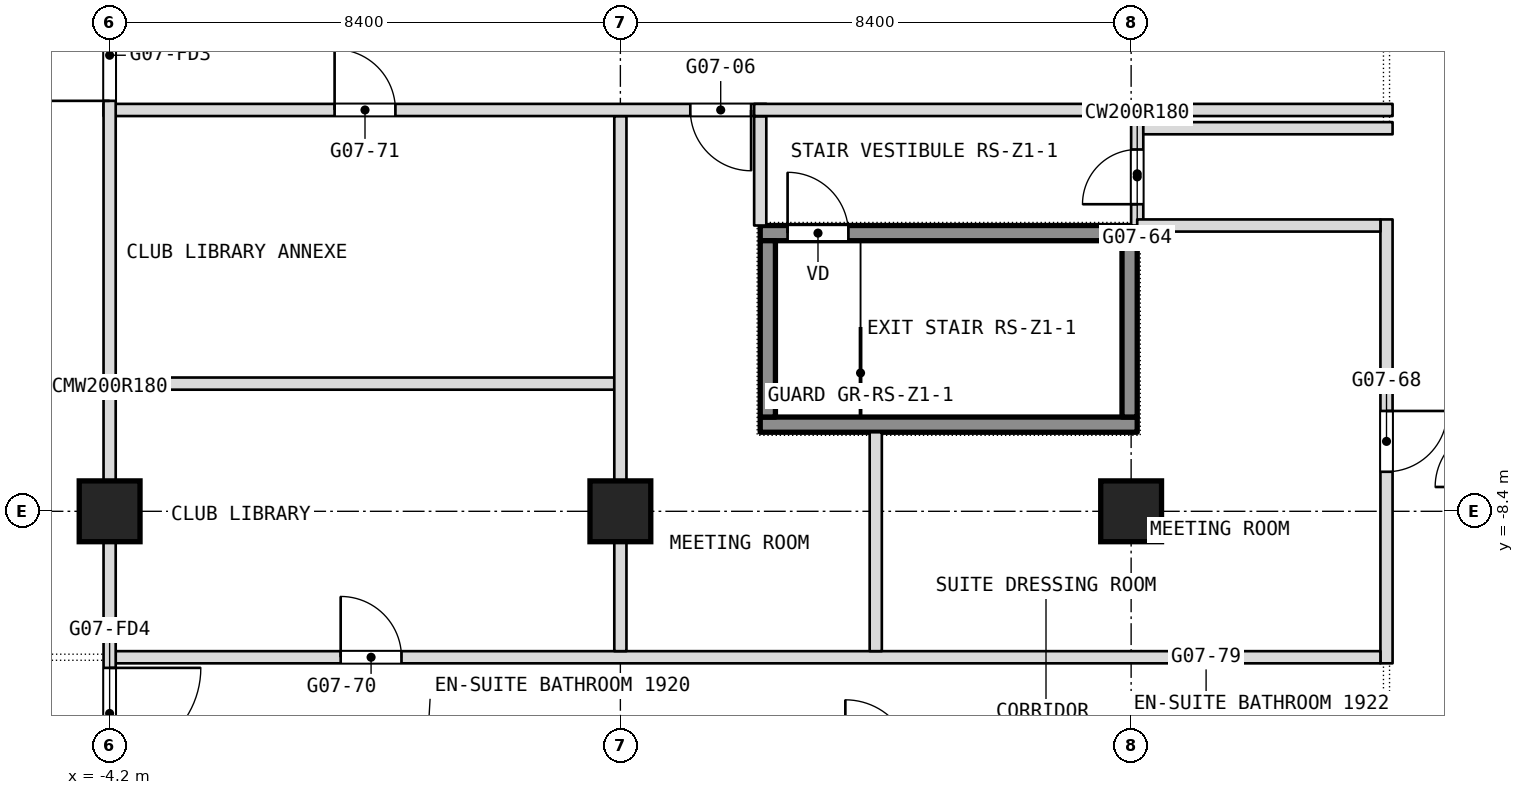
"""IFC4 building model, lengths in metres.
Left out: names, types, materials, properties, quantities, classifications, styles, units other than length and angle.
Written with IfcOpenShell. Run it as: python <this file> out.ifc"""

import sys

from ifc_helpers import new_model, si_unit, direction, frame, frame_2d, origin, origin_2d, place, context, subcontext, project, spatial, rectangle, extrude, element, fill, save


model = new_model("IFC4")
c1 = context("Model", 3, precision=1e-05, world=origin(), true_north=direction((0.0, 1.0)))
c2 = subcontext(c1, "Body", "Model", "MODEL_VIEW")
j1 = project(units=[si_unit("LENGTHUNIT", "METRE"), si_unit("PLANEANGLEUNIT", "RADIAN")], contexts=[c1])
p1 = place(None, origin())
s1 = spatial("IfcSite", under=j1, at=p1, CompositionType="ELEMENT")
p2 = place(p1, origin())
s2 = spatial("IfcBuilding", under=s1, at=p2, CompositionType="ELEMENT")
p3 = place(p2, frame((0.0, 0.0, 83.3)))
s3 = spatial("IfcBuildingStorey", under=s2, at=p3, CompositionType="ELEMENT", Elevation=83.3)
for number, where, z_axis, x_axis in (
    (1, (-4.2, -8.4, 0.0), (0.0, 0.0, 1.0), (1.0, 0.0, 0.0)),
    (2, (4.2, -8.4, 0.0), (0.0, 0.0, 1.0), (1.0, 0.0, 0.0)),
    (3, (12.6, -8.4, 0.0), (0.0, 0.0, 1.0), (1.0, 0.0, 0.0)),
):
    element("IfcColumn", number, at=place(p3, frame(where, z_axis=z_axis, x_axis=x_axis)), inside=s3, PredefinedType="COLUMN", context=c2, shape_type="SweptSolid", body=[
        extrude(rectangle(XDim=1.0, YDim=1.0, at=origin_2d()), origin(), (0.0, 0.0, 1.0), 3.6),
    ])
p4 = place(p3, frame((16.8, -10.9, 0.0), z_axis=(0.0, 0.0, 1.0), x_axis=(0.0, 1.0, 0.0)))
e4 = element("IfcWall", 4, at=p4, inside=s3, PredefinedType="PARTITIONING", context=c2, shape_type="SweptSolid", body=[
    extrude(rectangle(XDim=7.3, YDim=0.2, at=frame_2d((3.65, 0.0))), origin(), (0.0, 0.0, 1.0), 3.3),
])
p5 = place(p4, frame((3.15, 0.0, 0.0)))
e5 = element("IfcOpeningElement", 5, at=p5, cuts=e4, PredefinedType="OPENING", context=c2, shape_type="SweptSolid", body=[
    extrude(rectangle(XDim=1.0, YDim=2.1, at=frame_2d((0.5, 1.05))), frame((0.0, 0.1, 0.0), z_axis=(0.0, -1.0, 0.0), x_axis=(1.0, 0.0, 0.0)), (0.0, 0.0, 1.0), 0.2),
])
p6 = place(p3, frame((12.7, -3.7, 0.0), z_axis=(0.0, 0.0, 1.0), x_axis=(0.0, 1.0, 0.0)))
e6 = element("IfcWall", 6, at=p6, inside=s3, PredefinedType="PARTITIONING", context=c2, shape_type="SweptSolid", body=[
    extrude(rectangle(XDim=1.7, YDim=0.2, at=frame_2d((0.85, 0.0))), origin(), (0.0, 0.0, 1.0), 2.486),
])
p7 = place(p6, frame((0.35, 0.0, 0.0)))
e7 = element("IfcOpeningElement", 7, at=p7, cuts=e6, PredefinedType="OPENING", context=c2, shape_type="SweptSolid", body=[
    extrude(rectangle(XDim=0.9, YDim=2.1, at=frame_2d((0.45, 1.05))), frame((0.0, 0.1, 0.0), z_axis=(0.0, -1.0, 0.0), x_axis=(1.0, 0.0, 0.0)), (0.0, 0.0, 1.0), 0.2),
])
p8 = place(p3, frame((-4.1, -10.8, 0.0), z_axis=(0.0, 0.0, 1.0), x_axis=(1.0, 0.0, 0.0)))
e8 = element("IfcWall", 8, at=p8, inside=s3, PredefinedType="PARTITIONING", context=c2, shape_type="SweptSolid", body=[
    extrude(rectangle(XDim=20.8, YDim=0.2, at=frame_2d((10.4, 0.0))), origin(), (0.0, 0.0, 1.0), 3.3),
])
p9 = place(p8, frame((3.7, 0.0, 0.0)))
e9 = element("IfcOpeningElement", 9, at=p9, cuts=e8, PredefinedType="OPENING", context=c2, shape_type="SweptSolid", body=[
    extrude(rectangle(XDim=1.0, YDim=2.1, at=frame_2d((0.5, 1.05))), frame((0.0, 0.1, 0.0), z_axis=(0.0, -1.0, 0.0), x_axis=(1.0, 0.0, 0.0)), (0.0, 0.0, 1.0), 0.2),
])
p10 = place(p3, frame((8.4, -10.7, 0.0), z_axis=(0.0, 0.0, 1.0), x_axis=(0.0, 1.0, 0.0)))
e10 = element("IfcWall", 10, at=p10, inside=s3, PredefinedType="PARTITIONING", context=c2, shape_type="SweptSolid", body=[
    extrude(rectangle(XDim=3.6, YDim=0.2, at=frame_2d((1.8, 0.0))), origin(), (0.0, 0.0, 1.0), 3.3),
])
p11 = place(p3, frame((6.5, -3.7, 0.0), z_axis=(0.0, 0.0, 1.0), x_axis=(0.0, 1.0, 0.0)))
e11 = element("IfcWall", 11, at=p11, inside=s3, PredefinedType="PARTITIONING", context=c2, shape_type="SweptSolid", body=[
    extrude(rectangle(XDim=1.8, YDim=0.2, at=frame_2d((0.9, 0.0))), origin(), (0.0, 0.0, 1.0), 3.3),
])
p12 = place(p3, frame((-4.1, -6.3, 0.0), z_axis=(0.0, 0.0, 1.0), x_axis=(1.0, 0.0, 0.0)))
e12 = element("IfcWall", 12, at=p12, inside=s3, PredefinedType="PARTITIONING", context=c2, shape_type="SweptSolid", body=[
    extrude(rectangle(XDim=8.2, YDim=0.2, at=frame_2d((4.1, 0.0))), origin(), (0.0, 0.0, 1.0), 3.3),
])
p13 = place(p3, frame((4.2, -10.7, 0.0), z_axis=(0.0, 0.0, 1.0), x_axis=(0.0, 1.0, 0.0)))
e13 = element("IfcWall", 13, at=p13, inside=s3, PredefinedType="PARTITIONING", context=c2, shape_type="SweptSolid", body=[
    extrude(rectangle(XDim=8.8, YDim=0.2, at=frame_2d((4.4, 0.0))), origin(), (0.0, 0.0, 1.0), 2.486),
])
p14 = place(p3, frame((12.7, -3.7, 0.0), z_axis=(0.0, 0.0, 1.0), x_axis=(1.0, 0.0, 0.0)))
e14 = element("IfcWall", 14, at=p14, inside=s3, PredefinedType="PARTITIONING", context=c2, shape_type="SweptSolid", body=[
    extrude(rectangle(XDim=4.0, YDim=0.2, at=frame_2d((2.0, 0.0))), origin(), (0.0, 0.0, 1.0), 3.3),
])
p15 = place(p3, frame((12.8, -2.1, 0.0), z_axis=(0.0, 0.0, 1.0), x_axis=(1.0, 0.0, 0.0)))
e15 = element("IfcWall", 15, at=p15, inside=s3, PredefinedType="PARTITIONING", context=c2, shape_type="SweptSolid", body=[
    extrude(rectangle(XDim=4.1, YDim=0.2, at=frame_2d((2.05, 0.0))), origin(), (0.0, 0.0, 1.0), 3.3),
])
p16 = place(p3, frame((-4.3, -1.8, 0.0), z_axis=(0.0, 0.0, 1.0), x_axis=(1.0, 0.0, 0.0)))
e16 = element("IfcWall", 16, at=p16, inside=s3, PredefinedType="PARTITIONING", context=c2, shape_type="SweptSolid", body=[
    extrude(rectangle(XDim=10.9, YDim=0.2, at=frame_2d((5.45, 0.0))), origin(), (0.0, 0.0, 1.0), 3.3),
])
p17 = place(p16, frame((9.65, 0.0, 0.0)))
e17 = element("IfcOpeningElement", 17, at=p17, cuts=e16, PredefinedType="OPENING", context=c2, shape_type="SweptSolid", body=[
    extrude(rectangle(XDim=1.0, YDim=2.1, at=frame_2d((0.5, 1.05))), frame((0.0, 0.1, 0.0), z_axis=(0.0, -1.0, 0.0), x_axis=(1.0, 0.0, 0.0)), (0.0, 0.0, 1.0), 0.2),
])
p18 = place(p16, frame((3.8, 0.0, 0.0)))
e18 = element("IfcOpeningElement", 18, at=p18, cuts=e16, PredefinedType="OPENING", context=c2, shape_type="SweptSolid", body=[
    extrude(rectangle(XDim=1.0, YDim=2.1, at=frame_2d((0.5, 1.05))), frame((0.0, 0.1, 0.0), z_axis=(0.0, -1.0, 0.0), x_axis=(1.0, 0.0, 0.0)), (0.0, 0.0, 1.0), 0.2),
])
p19 = place(p3, frame((6.4, -1.8, 0.0), z_axis=(0.0, 0.0, 1.0), x_axis=(1.0, 0.0, 0.0)))
e19 = element("IfcWall", 19, at=p19, inside=s3, PredefinedType="PARTITIONING", context=c2, shape_type="SweptSolid", body=[
    extrude(rectangle(XDim=10.5, YDim=0.2, at=frame_2d((5.25, 0.0))), origin(), (0.0, 0.0, 1.0), 3.3),
])
p20 = place(p3, frame((-4.2, -12.7, 0.0), z_axis=(0.0, 0.0, 1.0), x_axis=(0.0, 1.0, 0.0)))
e20 = element("IfcWall", 20, at=p20, inside=s3, PredefinedType="PARTITIONING", context=c2, shape_type="SweptSolid", body=[
    extrude(rectangle(XDim=12.7, YDim=0.2, at=frame_2d((6.35, 0.0))), origin(), (0.0, 0.0, 1.0), 2.486),
])
p21 = place(p20, frame((11.05, 0.0, 0.0)))
e21 = element("IfcOpeningElement", 21, at=p21, cuts=e20, PredefinedType="OPENING", context=c2, shape_type="SweptSolid", body=[
    extrude(rectangle(XDim=1.5, YDim=2.1, at=frame_2d((0.75, 1.05))), frame((0.0, 0.1, 0.0), z_axis=(0.0, -1.0, 0.0), x_axis=(1.0, 0.0, 0.0)), (0.0, 0.0, 1.0), 0.2),
])
p22 = place(p20, frame((0.225, 0.0, 0.0)))
e22 = element("IfcOpeningElement", 22, at=p22, cuts=e20, PredefinedType="OPENING", context=c2, shape_type="SweptSolid", body=[
    extrude(rectangle(XDim=1.5, YDim=2.1, at=frame_2d((0.75, 1.05))), frame((0.0, 0.1, 0.0), z_axis=(0.0, -1.0, 0.0), x_axis=(1.0, 0.0, 0.0)), (0.0, 0.0, 1.0), 0.2),
])
p23 = place(p3, frame((6.5, -6.975, 0.1), z_axis=(0.0, 0.0, 1.0), x_axis=(1.0, 0.0, 0.0)))
e23 = element("IfcWall", 23, at=p23, inside=s3, PredefinedType="SHEAR", context=c2, shape_type="SweptSolid", body=[
    extrude(rectangle(XDim=6.2, YDim=0.25, at=frame_2d((3.1, 0.0))), origin(), (0.0, 0.0, 1.0), 3.2),
])
p24 = place(p3, frame((6.5, -3.825, 0.1), z_axis=(0.0, 0.0, 1.0), x_axis=(1.0, 0.0, 0.0)))
e24 = element("IfcWall", 24, at=p24, inside=s3, PredefinedType="SHEAR", context=c2, shape_type="SweptSolid", body=[
    extrude(rectangle(XDim=6.2, YDim=0.25, at=frame_2d((3.1, 0.0))), origin(), (0.0, 0.0, 1.0), 3.2),
])
p25 = place(p24, frame((0.45, 0.0, 0.0)))
e25 = element("IfcOpeningElement", 25, at=p25, cuts=e24, PredefinedType="OPENING", context=c2, shape_type="SweptSolid", body=[
    extrude(rectangle(XDim=1.0, YDim=2.1, at=frame_2d((0.5, 1.05))), frame((0.0, 0.125, 0.0), z_axis=(0.0, -1.0, 0.0), x_axis=(1.0, 0.0, 0.0)), (0.0, 0.0, 1.0), 0.25),
])
for number, where, z_axis, x_axis in (
    (26, (6.625, -6.85, 0.1), (0.0, 0.0, 1.0), (0.0, 1.0, 0.0)),
    (27, (12.575, -6.85, 0.1), (0.0, 0.0, 1.0), (0.0, 1.0, 0.0)),
):
    element("IfcWall", number, at=place(p3, frame(where, z_axis=z_axis, x_axis=x_axis)), inside=s3, PredefinedType="SHEAR", context=c2, shape_type="SweptSolid", body=[
        extrude(rectangle(XDim=2.9, YDim=0.25, at=frame_2d((1.45, 0.0))), origin(), (0.0, 0.0, 1.0), 3.2),
    ])
p26 = place(p5, origin())
e28 = element("IfcDoor", 28, at=p26, inside=s3, OperationType="SINGLE_SWING_RIGHT", PredefinedType="DOOR", context=c2, shape_type="SweptSolid", body=[
    extrude(rectangle(XDim=1.0, YDim=2.1, at=frame_2d((0.5, 1.05))), frame((0.0, 0.025, 0.0), z_axis=(0.0, -1.0, 0.0), x_axis=(1.0, 0.0, 0.0)), (0.0, 0.0, 1.0), 0.05),
])
fill(e5, e28)
p27 = place(p7, origin())
e29 = element("IfcDoor", 29, at=p27, inside=s3, OperationType="SINGLE_SWING_LEFT", PredefinedType="DOOR", context=c2, shape_type="SweptSolid", body=[
    extrude(rectangle(XDim=0.9, YDim=2.1, at=frame_2d((0.45, 1.05))), frame((0.0, 0.025, 0.0), z_axis=(0.0, -1.0, 0.0), x_axis=(1.0, 0.0, 0.0)), (0.0, 0.0, 1.0), 0.05),
])
fill(e7, e29)
p28 = place(p9, origin())
e30 = element("IfcDoor", 30, at=p28, inside=s3, OperationType="SINGLE_SWING_RIGHT", PredefinedType="DOOR", context=c2, shape_type="SweptSolid", body=[
    extrude(rectangle(XDim=1.0, YDim=2.1, at=frame_2d((0.5, 1.05))), frame((0.0, 0.025, 0.0), z_axis=(0.0, -1.0, 0.0), x_axis=(1.0, 0.0, 0.0)), (0.0, 0.0, 1.0), 0.05),
])
fill(e9, e30)
p29 = place(p17, origin())
e31 = element("IfcDoor", 31, at=p29, inside=s3, OperationType="SINGLE_SWING_LEFT", PredefinedType="DOOR", context=c2, shape_type="SweptSolid", body=[
    extrude(rectangle(XDim=1.0, YDim=2.1, at=frame_2d((0.5, 1.05))), frame((0.0, 0.025, 0.0), z_axis=(0.0, -1.0, 0.0), x_axis=(1.0, 0.0, 0.0)), (0.0, 0.0, 1.0), 0.05),
])
fill(e17, e31)
p30 = place(p18, origin())
e32 = element("IfcDoor", 32, at=p30, inside=s3, OperationType="SINGLE_SWING_LEFT", PredefinedType="DOOR", context=c2, shape_type="SweptSolid", body=[
    extrude(rectangle(XDim=1.0, YDim=2.1, at=frame_2d((0.5, 1.05))), frame((0.0, 0.025, 0.0), z_axis=(0.0, -1.0, 0.0), x_axis=(1.0, 0.0, 0.0)), (0.0, 0.0, 1.0), 0.05),
])
fill(e18, e32)
p31 = place(p25, origin())
e33 = element("IfcDoor", 33, at=p31, inside=s3, OperationType="SINGLE_SWING_LEFT", PredefinedType="DOOR", context=c2, shape_type="SweptSolid", body=[
    extrude(rectangle(XDim=1.0, YDim=2.1, at=frame_2d((0.5, 1.05))), frame((0.0, 0.025, 0.0), z_axis=(0.0, -1.0, 0.0), x_axis=(1.0, 0.0, 0.0)), (0.0, 0.0, 1.0), 0.05),
])
fill(e25, e33)
p32 = place(p21, origin())
e34 = element("IfcDoor", 34, at=p32, inside=s3, OperationType="DOUBLE_DOOR_DOUBLE_SWING", PredefinedType="DOOR", context=c2, shape_type="SweptSolid", body=[
    extrude(rectangle(XDim=1.5, YDim=2.1, at=frame_2d((0.75, 1.05))), frame((0.0, 0.025, 0.0), z_axis=(0.0, -1.0, 0.0), x_axis=(1.0, 0.0, 0.0)), (0.0, 0.0, 1.0), 0.05),
])
fill(e21, e34)
p33 = place(p22, origin())
e35 = element("IfcDoor", 35, at=p33, inside=s3, OperationType="DOUBLE_DOOR_DOUBLE_SWING", PredefinedType="DOOR", context=c2, shape_type="SweptSolid", body=[
    extrude(rectangle(XDim=1.5, YDim=2.1, at=frame_2d((0.75, 1.05))), frame((0.0, 0.025, 0.0), z_axis=(0.0, -1.0, 0.0), x_axis=(1.0, 0.0, 0.0)), (0.0, 0.0, 1.0), 0.05),
])
fill(e22, e35)
save(model, sys.argv[1])
